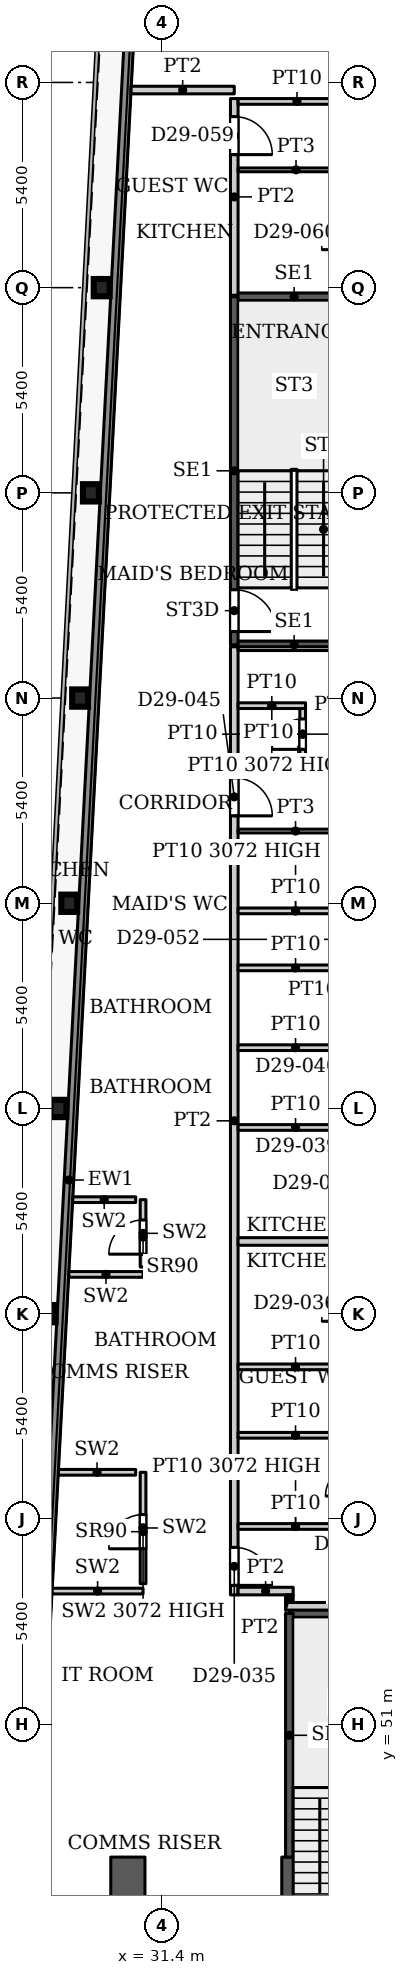
"""IFC4 building model, lengths in metres.
Left out: names, types, materials, properties, quantities, classifications, styles, units other than length and angle.
Written with IfcOpenShell. Run it as: python <this file> out.ifc"""

import sys

from ifc_helpers import new_model, si_unit, direction, frame, frame_2d, origin, origin_2d, place, context, subcontext, project, spatial, rectangle, i_section, extrude, source, transform, mapped, element, fill, save


model = new_model("IFC4")
c1 = context("Model", 3, precision=1e-05, world=origin(), true_north=direction((0.0, 1.0)))
c2 = subcontext(c1, "Body", "Model", "MODEL_VIEW")
j1 = project(units=[si_unit("LENGTHUNIT", "METRE"), si_unit("PLANEANGLEUNIT", "RADIAN")], contexts=[c1])
p1 = place(None, origin())
s1 = spatial("IfcSite", under=j1, at=p1, CompositionType="ELEMENT")
p2 = place(p1, origin())
s2 = spatial("IfcBuilding", under=s1, at=p2, CompositionType="ELEMENT")
p3 = place(p2, frame((0.0, 0.0, 129.2)))
s3 = spatial("IfcBuildingStorey", under=s2, at=p3, CompositionType="ELEMENT", Elevation=129.2)
for number, where, z_axis, x_axis in (
    (1, (28.39, 61.8, 0.0), (0.0, 0.0, 1.0), (1.0, 0.0, 0.0)),
    (2, (28.674, 67.2, 0.0), (0.0, 0.0, 1.0), (1.0, 0.0, 0.0)),
    (3, (28.958, 72.6, 0.0), (0.0, 0.0, 1.0), (1.0, 0.0, 0.0)),
    (4, (29.243, 78.0, 0.0), (0.0, 0.0, 1.0), (1.0, 0.0, 0.0)),
    (5, (29.527, 83.4, 0.0), (0.0, 0.0, 1.0), (1.0, 0.0, 0.0)),
    (6, (29.811, 88.8, 0.0), (0.0, 0.0, 1.0), (1.0, 0.0, 0.0)),
):
    element("IfcColumn", number, at=place(p3, frame(where, z_axis=z_axis, x_axis=x_axis)), inside=s3, PredefinedType="COLUMN", context=c2, shape_type="SweptSolid", body=[
        extrude(i_section(OverallWidth=0.418, OverallDepth=0.455, WebThickness=0.042, FlangeThickness=0.068, FilletRadius=0.014, at=origin_2d()), origin(), (0.0, 0.0, 1.0), 3.9),
    ])
p4 = place(p3, frame((34.75, 29.05, 0.0), z_axis=(0.0, 0.0, 1.0), x_axis=(0.0, 1.0, 0.0)))
e7 = element("IfcWall", 7, at=p4, inside=s3, PredefinedType="SHEAR", context=c2, shape_type="SweptSolid", body=[
    extrude(rectangle(XDim=18.45, YDim=0.4, at=frame_2d((9.225, 0.0))), origin(), (0.0, 0.0, 1.0), 3.9),
])
p5 = place(p4, frame((8.025, 0.0, 0.0)))
e8 = element("IfcOpeningElement", 8, at=p5, cuts=e7, PredefinedType="OPENING", context=c2, shape_type="SweptSolid", body=[
    extrude(rectangle(XDim=1.1, YDim=2.2, at=frame_2d((0.55, 1.1))), frame((0.0, 0.21, 0.0), z_axis=(0.0, -1.0, 0.0), x_axis=(1.0, 0.0, 0.0)), (0.0, 0.0, 1.0), 0.42),
])
p6 = place(p4, frame((10.875, 0.0, 0.0)))
e9 = element("IfcOpeningElement", 9, at=p6, cuts=e7, PredefinedType="OPENING", context=c2, shape_type="SweptSolid", body=[
    extrude(rectangle(XDim=1.1, YDim=2.2, at=frame_2d((0.55, 1.1))), frame((0.0, 0.21, 0.0), z_axis=(0.0, -1.0, 0.0), x_axis=(1.0, 0.0, 0.0)), (0.0, 0.0, 1.0), 0.42),
])
p7 = place(p4, frame((13.725, 0.0, 0.0)))
e10 = element("IfcOpeningElement", 10, at=p7, cuts=e7, PredefinedType="OPENING", context=c2, shape_type="SweptSolid", body=[
    extrude(rectangle(XDim=1.1, YDim=2.2, at=frame_2d((0.55, 1.1))), frame((0.0, 0.21, 0.0), z_axis=(0.0, -1.0, 0.0), x_axis=(1.0, 0.0, 0.0)), (0.0, 0.0, 1.0), 0.42),
])
p8 = place(p4, frame((15.95, 0.0, 0.0)))
e11 = element("IfcOpeningElement", 11, at=p8, cuts=e7, PredefinedType="OPENING", context=c2, shape_type="SweptSolid", body=[
    extrude(rectangle(XDim=1.1, YDim=2.2, at=frame_2d((0.55, 1.1))), frame((0.0, 0.21, 0.0), z_axis=(0.0, -1.0, 0.0), x_axis=(1.0, 0.0, 0.0)), (0.0, 0.0, 1.0), 0.42),
])
p9 = place(p3, frame((30.5, 29.05, 0.0), z_axis=(0.0, 0.0, 1.0), x_axis=(0.0, 1.0, 0.0)))
e12 = element("IfcWall", 12, at=p9, inside=s3, PredefinedType="SHEAR", context=c2, shape_type="SweptSolid", body=[
    extrude(rectangle(XDim=18.45, YDim=0.9, at=frame_2d((9.225, 0.0))), origin(), (0.0, 0.0, 1.0), 3.9),
])
p10 = place(p9, frame((1.5, 0.0, 0.0)))
e13 = element("IfcOpeningElement", 13, at=p10, cuts=e12, PredefinedType="OPENING", context=c2, shape_type="SweptSolid", body=[
    extrude(rectangle(XDim=0.9, YDim=2.2, at=frame_2d((0.45, 1.1))), frame((0.0, 0.46, 0.0), z_axis=(0.0, -1.0, 0.0), x_axis=(1.0, 0.0, 0.0)), (0.0, 0.0, 1.0), 0.92),
])
p11 = place(p9, frame((7.406, 0.0, 0.0)))
e14 = element("IfcOpeningElement", 14, at=p11, cuts=e12, PredefinedType="OPENING", context=c2, shape_type="SweptSolid", body=[
    extrude(rectangle(XDim=0.9, YDim=2.2, at=frame_2d((0.45, 1.1))), frame((0.0, 0.46, 0.0), z_axis=(0.0, -1.0, 0.0), x_axis=(1.0, 0.0, 0.0)), (0.0, 0.0, 1.0), 0.92),
])
p12 = place(p9, frame((11.688, 0.0, 0.0)))
e15 = element("IfcOpeningElement", 15, at=p12, cuts=e12, PredefinedType="OPENING", context=c2, shape_type="SweptSolid", body=[
    extrude(rectangle(XDim=0.9, YDim=2.2, at=frame_2d((0.45, 1.1))), frame((0.0, 0.46, 0.0), z_axis=(0.0, -1.0, 0.0), x_axis=(1.0, 0.0, 0.0)), (0.0, 0.0, 1.0), 0.92),
])
p13 = place(p3, frame((27.195, 31.969, 0.0), z_axis=(0.0, 0.0, 1.0), x_axis=(0.052554995867, 0.998618031286, 0.0)))
e16 = element("IfcWall", 16, at=p13, inside=s3, PredefinedType="SOLIDWALL", context=c2, shape_type="SweptSolid", body=[
    extrude(rectangle(XDim=66.787, YDim=0.25, at=frame_2d((33.394, 0.0))), origin(), (0.0, 0.0, 1.0), 3.75),
])
p14 = place(p3, frame((34.75, 53.91, 0.0), z_axis=(0.0, 0.0, 1.0), x_axis=(1.0, 0.0, 0.0)))
e17 = element("IfcWall", 17, at=p14, inside=s3, PredefinedType="SHEAR", context=c2, shape_type="SweptSolid", body=[
    extrude(rectangle(XDim=3.15, YDim=0.2, at=frame_2d((1.575, 0.0))), origin(), (0.0, 0.0, 1.0), 3.9),
])
p15 = place(p3, frame((34.75, 47.5, 0.0), z_axis=(0.0, 0.0, 1.0), x_axis=(0.0, 1.0, 0.0)))
e18 = element("IfcWall", 18, at=p15, inside=s3, PredefinedType="SHEAR", context=c2, shape_type="SweptSolid", body=[
    extrude(rectangle(XDim=6.41, YDim=0.2, at=frame_2d((3.205, 0.0))), origin(), (0.0, 0.0, 1.0), 3.9),
])
for number, where, z_axis, x_axis in (
    (19, (33.3, 79.4, 0.0), (0.0, 0.0, 1.0), (1.0, 0.0, 0.0)),
    (20, (33.3, 88.56, 0.0), (0.0, 0.0, 1.0), (1.0, 0.0, 0.0)),
):
    element("IfcWall", number, at=place(p3, frame(where, z_axis=z_axis, x_axis=x_axis)), inside=s3, PredefinedType="SHEAR", context=c2, shape_type="SweptSolid", body=[
        extrude(rectangle(XDim=3.15, YDim=0.2, at=frame_2d((1.575, 0.0))), origin(), (0.0, 0.0, 1.0), 3.9),
    ])
p16 = place(p3, frame((33.3, 79.4, 0.0), z_axis=(0.0, 0.0, 1.0), x_axis=(0.0, 1.0, 0.0)))
e21 = element("IfcWall", 21, at=p16, inside=s3, PredefinedType="SHEAR", context=c2, shape_type="SweptSolid", body=[
    extrude(rectangle(XDim=9.16, YDim=0.2, at=frame_2d((4.58, 0.0))), origin(), (0.0, 0.0, 1.0), 3.9),
])
p17 = place(p16, frame((0.35, 0.0, 0.0)))
e22 = element("IfcOpeningElement", 22, at=p17, cuts=e21, PredefinedType="OPENING", context=c2, shape_type="SweptSolid", body=[
    extrude(rectangle(XDim=1.1, YDim=2.2, at=frame_2d((0.55, 1.1))), frame((0.0, 0.11, 0.0), z_axis=(0.0, -1.0, 0.0), x_axis=(1.0, 0.0, 0.0)), (0.0, 0.0, 1.0), 0.22),
])
p18 = place(p3, frame((28.508, 54.5, 0.0), z_axis=(0.0, 0.0, 1.0), x_axis=(1.0, 0.0, 0.0)))
e23 = element("IfcWall", 23, at=p18, inside=s3, PredefinedType="PARTITIONING", context=c2, shape_type="SweptSolid", body=[
    extrude(rectangle(XDim=2.392, YDim=0.15, at=frame_2d((1.196, 0.0))), origin(), (0.0, 0.0, 1.0), 3.9),
])
p19 = place(p3, frame((30.9, 54.695, 0.0), z_axis=(0.0, 0.0, 1.0), x_axis=(0.0, 1.0, 0.0)))
e24 = element("IfcWall", 24, at=p19, inside=s3, PredefinedType="PARTITIONING", context=c2, shape_type="SweptSolid", body=[
    extrude(rectangle(XDim=2.931, YDim=0.15, at=frame_2d((1.465, 0.0))), origin(), (0.0, 0.0, 1.0), 3.072),
])
p20 = place(p19, frame((0.918, 0.0, 0.0)))
e25 = element("IfcOpeningElement", 25, at=p20, cuts=e24, PredefinedType="OPENING", context=c2, shape_type="SweptSolid", body=[
    extrude(rectangle(XDim=0.9, YDim=2.2, at=frame_2d((0.45, 1.1))), frame((0.0, 0.085, 0.0), z_axis=(0.0, -1.0, 0.0), x_axis=(1.0, 0.0, 0.0)), (0.0, 0.0, 1.0), 0.17),
])
p21 = place(p3, frame((28.673, 57.626, 0.0), z_axis=(0.0, 0.0, 1.0), x_axis=(1.0, 0.0, 0.0)))
e26 = element("IfcWall", 26, at=p21, inside=s3, PredefinedType="PARTITIONING", context=c2, shape_type="SweptSolid", body=[
    extrude(rectangle(XDim=2.032, YDim=0.15, at=frame_2d((1.016, 0.0))), origin(), (0.0, 0.0, 1.0), 3.9),
])
p22 = place(p3, frame((28.947, 62.833, 0.0), z_axis=(0.0, 0.0, 1.0), x_axis=(1.0, 0.0, 0.0)))
e27 = element("IfcWall", 27, at=p22, inside=s3, PredefinedType="PARTITIONING", context=c2, shape_type="SweptSolid", body=[
    extrude(rectangle(XDim=1.953, YDim=0.15, at=frame_2d((0.977, 0.0))), origin(), (0.0, 0.0, 1.0), 3.9),
])
p23 = place(p3, frame((30.9, 63.028, 0.0), z_axis=(0.0, 0.0, 1.0), x_axis=(0.0, 1.0, 0.0)))
e28 = element("IfcWall", 28, at=p23, inside=s3, PredefinedType="PARTITIONING", context=c2, shape_type="SweptSolid", body=[
    extrude(rectangle(XDim=1.772, YDim=0.15, at=frame_2d((0.886, 0.0))), origin(), (0.0, 0.0, 1.0), 3.9),
])
p24 = place(p23, frame((0.338, 0.0, 0.0)))
e29 = element("IfcOpeningElement", 29, at=p24, cuts=e28, PredefinedType="OPENING", context=c2, shape_type="SweptSolid", body=[
    extrude(rectangle(XDim=0.9, YDim=2.2, at=frame_2d((0.45, 1.1))), frame((0.0, 0.085, 0.0), z_axis=(0.0, -1.0, 0.0), x_axis=(1.0, 0.0, 0.0)), (0.0, 0.0, 1.0), 0.17),
])
p25 = place(p3, frame((29.05, 64.8, 0.0), z_axis=(0.0, 0.0, 1.0), x_axis=(1.0, 0.0, 0.0)))
e30 = element("IfcWall", 30, at=p25, inside=s3, PredefinedType="PARTITIONING", context=c2, shape_type="SweptSolid", body=[
    extrude(rectangle(XDim=1.655, YDim=0.15, at=frame_2d((0.828, 0.0))), origin(), (0.0, 0.0, 1.0), 3.9),
])
p26 = place(p3, frame((30.585, 94.0, 0.0), z_axis=(0.0, 0.0, 1.0), x_axis=(1.0, 0.0, 0.0)))
e31 = element("IfcWall", 31, at=p26, inside=s3, PredefinedType="PARTITIONING", context=c2, shape_type="SweptSolid", body=[
    extrude(rectangle(XDim=2.715, YDim=0.2, at=frame_2d((1.358, 0.0))), origin(), (0.0, 0.0, 1.0), 3.6),
])
p27 = place(p3, frame((33.3, 54.4, 0.0), z_axis=(0.0, 0.0, 1.0), x_axis=(0.0, 1.0, 0.0)))
e32 = element("IfcWall", 32, at=p27, inside=s3, PredefinedType="PARTITIONING", context=c2, shape_type="SweptSolid", body=[
    extrude(rectangle(XDim=24.95, YDim=0.2, at=frame_2d((12.475, 0.0))), origin(), (0.0, 0.0, 1.0), 3.6),
])
p28 = place(p27, frame((0.25, 0.0, 0.0)))
e33 = element("IfcOpeningElement", 33, at=p28, cuts=e32, PredefinedType="OPENING", context=c2, shape_type="SweptSolid", body=[
    extrude(rectangle(XDim=1.0, YDim=2.1, at=frame_2d((0.5, 1.05))), frame((0.0, 0.11, 0.0), z_axis=(0.0, -1.0, 0.0), x_axis=(1.0, 0.0, 0.0)), (0.0, 0.0, 1.0), 0.22),
])
p29 = place(p27, frame((20.5, 0.0, 0.0)))
e34 = element("IfcOpeningElement", 34, at=p29, cuts=e32, PredefinedType="OPENING", context=c2, shape_type="SweptSolid", body=[
    extrude(rectangle(XDim=1.0, YDim=2.1, at=frame_2d((0.5, 1.05))), frame((0.0, 0.11, 0.0), z_axis=(0.0, -1.0, 0.0), x_axis=(1.0, 0.0, 0.0)), (0.0, 0.0, 1.0), 0.22),
])
p30 = place(p3, frame((33.3, 88.6, 0.0), z_axis=(0.0, 0.0, 1.0), x_axis=(0.0, 1.0, 0.0)))
e35 = element("IfcWall", 35, at=p30, inside=s3, PredefinedType="PARTITIONING", context=c2, shape_type="SweptSolid", body=[
    extrude(rectangle(XDim=5.175, YDim=0.2, at=frame_2d((2.587, 0.0))), origin(), (0.0, 0.0, 1.0), 3.6),
])
p31 = place(p30, frame((3.7, 0.0, 0.0)))
e36 = element("IfcOpeningElement", 36, at=p31, cuts=e35, PredefinedType="OPENING", context=c2, shape_type="SweptSolid", body=[
    extrude(rectangle(XDim=1.0, YDim=2.1, at=frame_2d((0.5, 1.05))), frame((0.0, 0.11, 0.0), z_axis=(0.0, -1.0, 0.0), x_axis=(1.0, 0.0, 0.0)), (0.0, 0.0, 1.0), 0.22),
])
p32 = place(p3, frame((33.4, 54.5, 0.0), z_axis=(0.0, 0.0, 1.0), x_axis=(1.0, 0.0, 0.0)))
e37 = element("IfcWall", 37, at=p32, inside=s3, PredefinedType="PARTITIONING", context=c2, shape_type="SweptSolid", body=[
    extrude(rectangle(XDim=1.45, YDim=0.2, at=frame_2d((0.725, 0.0))), origin(), (0.0, 0.0, 1.0), 3.6),
])
p33 = place(p3, frame((33.4, 56.2, 0.0), z_axis=(0.0, 0.0, 1.0), x_axis=(1.0, 0.0, 0.0)))
e38 = element("IfcWall", 38, at=p33, inside=s3, PredefinedType="PARTITIONING", context=c2, shape_type="SweptSolid", body=[
    extrude(rectangle(XDim=3.025, YDim=0.15, at=frame_2d((1.513, 0.0))), origin(), (0.0, 0.0, 1.0), 3.072),
])
for number, where, z_axis, x_axis in (
    (39, (33.4, 58.6, 0.0), (0.0, 0.0, 1.0), (1.0, 0.0, 0.0)),
    (40, (33.4, 60.4, 0.0), (0.0, 0.0, 1.0), (1.0, 0.0, 0.0)),
):
    element("IfcWall", number, at=place(p3, frame(where, z_axis=z_axis, x_axis=x_axis)), inside=s3, PredefinedType="PARTITIONING", context=c2, shape_type="SweptSolid", body=[
        extrude(rectangle(XDim=3.025, YDim=0.15, at=frame_2d((1.513, 0.0))), origin(), (0.0, 0.0, 1.0), 3.6),
    ])
p34 = place(p3, frame((33.4, 63.7, 0.0), z_axis=(0.0, 0.0, 1.0), x_axis=(1.0, 0.0, 0.0)))
e41 = element("IfcWall", 41, at=p34, inside=s3, PredefinedType="PARTITIONING", context=c2, shape_type="SweptSolid", body=[
    extrude(rectangle(XDim=12.5, YDim=0.2, at=frame_2d((6.25, 0.0))), origin(), (0.0, 0.0, 1.0), 3.6),
])
for number, where, z_axis, x_axis in (
    (42, (33.4, 66.7, 0.0), (0.0, 0.0, 1.0), (1.0, 0.0, 0.0)),
    (43, (33.4, 68.8, 0.0), (0.0, 0.0, 1.0), (1.0, 0.0, 0.0)),
    (44, (33.4, 70.9, 0.0), (0.0, 0.0, 1.0), (1.0, 0.0, 0.0)),
):
    element("IfcWall", number, at=place(p3, frame(where, z_axis=z_axis, x_axis=x_axis)), inside=s3, PredefinedType="PARTITIONING", context=c2, shape_type="SweptSolid", body=[
        extrude(rectangle(XDim=3.025, YDim=0.15, at=frame_2d((1.513, 0.0))), origin(), (0.0, 0.0, 1.0), 3.6),
    ])
p35 = place(p3, frame((33.4, 72.4, 0.0), z_axis=(0.0, 0.0, 1.0), x_axis=(1.0, 0.0, 0.0)))
e45 = element("IfcWall", 45, at=p35, inside=s3, PredefinedType="PARTITIONING", context=c2, shape_type="SweptSolid", body=[
    extrude(rectangle(XDim=3.025, YDim=0.15, at=frame_2d((1.513, 0.0))), origin(), (0.0, 0.0, 1.0), 3.072),
])
p36 = place(p3, frame((33.4, 74.5, 0.0), z_axis=(0.0, 0.0, 1.0), x_axis=(1.0, 0.0, 0.0)))
e46 = element("IfcWall", 46, at=p36, inside=s3, PredefinedType="PARTITIONING", context=c2, shape_type="SweptSolid", body=[
    extrude(rectangle(XDim=3.025, YDim=0.1, at=frame_2d((1.513, 0.0))), origin(), (0.0, 0.0, 1.0), 3.6),
])
p37 = place(p3, frame((33.4, 76.3, 0.0), z_axis=(0.0, 0.0, 1.0), x_axis=(1.0, 0.0, 0.0)))
e47 = element("IfcWall", 47, at=p37, inside=s3, PredefinedType="PARTITIONING", context=c2, shape_type="SweptSolid", body=[
    extrude(rectangle(XDim=3.15, YDim=0.15, at=frame_2d((1.575, 0.0))), origin(), (0.0, 0.0, 1.0), 3.6),
])
p38 = place(p3, frame((33.4, 77.8, 0.0), z_axis=(0.0, 0.0, 1.0), x_axis=(1.0, 0.0, 0.0)))
e48 = element("IfcWall", 48, at=p38, inside=s3, PredefinedType="PARTITIONING", context=c2, shape_type="SweptSolid", body=[
    extrude(rectangle(XDim=1.775, YDim=0.15, at=frame_2d((0.888, 0.0))), origin(), (0.0, 0.0, 1.0), 3.072),
])
p39 = place(p3, frame((33.4, 79.3, 0.0), z_axis=(0.0, 0.0, 1.0), x_axis=(1.0, 0.0, 0.0)))
e49 = element("IfcWall", 49, at=p39, inside=s3, PredefinedType="PARTITIONING", context=c2, shape_type="SweptSolid", body=[
    extrude(rectangle(XDim=12.5, YDim=0.1, at=frame_2d((6.25, 0.0))), origin(), (0.0, 0.0, 1.0), 3.6),
])
p40 = place(p39, frame((3.35, 0.0, 0.0)))
e50 = element("IfcOpeningElement", 50, at=p40, cuts=e49, PredefinedType="OPENING", context=c2, shape_type="SweptSolid", body=[
    extrude(rectangle(XDim=0.9, YDim=2.1, at=frame_2d((0.45, 1.05))), frame((0.0, 0.06, 0.0), z_axis=(0.0, -1.0, 0.0), x_axis=(1.0, 0.0, 0.0)), (0.0, 0.0, 1.0), 0.12),
])
p41 = place(p3, frame((33.4, 91.9, 0.0), z_axis=(0.0, 0.0, 1.0), x_axis=(1.0, 0.0, 0.0)))
e51 = element("IfcWall", 51, at=p41, inside=s3, PredefinedType="PARTITIONING", context=c2, shape_type="SweptSolid", body=[
    extrude(rectangle(XDim=3.05, YDim=0.1, at=frame_2d((1.525, 0.0))), origin(), (0.0, 0.0, 1.0), 3.6),
])
p42 = place(p3, frame((33.4, 93.7, 0.0), z_axis=(0.0, 0.0, 1.0), x_axis=(1.0, 0.0, 0.0)))
e52 = element("IfcWall", 52, at=p42, inside=s3, PredefinedType="PARTITIONING", context=c2, shape_type="SweptSolid", body=[
    extrude(rectangle(XDim=3.1, YDim=0.15, at=frame_2d((1.55, 0.0))), origin(), (0.0, 0.0, 1.0), 3.6),
])
p43 = place(p3, frame((34.65, 54.1, 0.0), z_axis=(0.0, 0.0, 1.0), x_axis=(1.0, 0.0, 0.0)))
e53 = element("IfcWall", 53, at=p43, inside=s3, PredefinedType="PARTITIONING", context=c2, shape_type="SweptSolid", body=[
    extrude(rectangle(XDim=11.25, YDim=0.2, at=frame_2d((5.625, 0.0))), origin(), (0.0, 0.0, 1.0), 3.6),
])
p44 = place(p3, frame((34.75, 54.2, 0.0), z_axis=(0.0, 0.0, 1.0), x_axis=(0.0, 1.0, 0.0)))
e54 = element("IfcWall", 54, at=p44, inside=s3, PredefinedType="PARTITIONING", context=c2, shape_type="SweptSolid", body=[
    extrude(rectangle(XDim=0.2, YDim=0.2, at=frame_2d((0.1, 0.0))), origin(), (0.0, 0.0, 1.0), 3.6),
])
p45 = place(p3, frame((35.1, 76.375, 0.0), z_axis=(0.0, 0.0, 1.0), x_axis=(0.0, 1.0, 0.0)))
e55 = element("IfcWall", 55, at=p45, inside=s3, PredefinedType="PARTITIONING", context=c2, shape_type="SweptSolid", body=[
    extrude(rectangle(XDim=1.35, YDim=0.15, at=frame_2d((0.675, 0.0))), origin(), (0.0, 0.0, 1.0), 3.6),
])
p46 = place(p45, frame((0.275, 0.0, 0.0)))
e56 = element("IfcOpeningElement", 56, at=p46, cuts=e55, PredefinedType="OPENING", context=c2, shape_type="SweptSolid", body=[
    extrude(rectangle(XDim=0.8, YDim=2.1, at=frame_2d((0.4, 1.05))), frame((0.0, 0.085, 0.0), z_axis=(0.0, -1.0, 0.0), x_axis=(1.0, 0.0, 0.0)), (0.0, 0.0, 1.0), 0.17),
])
m1 = source(origin(), c2, "Body", "SweptSolid", [
    extrude(rectangle(XDim=0.9, YDim=2.2, at=frame_2d((0.45, 1.1))), frame((0.0, 0.025, 0.0), z_axis=(0.0, -1.0, 0.0), x_axis=(1.0, 0.0, 0.0)), (0.0, 0.0, 1.0), 0.05),
])
p47 = place(p20, origin())
e57 = element("IfcDoor", 57, at=p47, inside=s3, OperationType="SINGLE_SWING_LEFT", PredefinedType="DOOR", context=c2, shape_type="MappedRepresentation", body=[
    mapped(m1, transform((0.0, 0.0, 0.0), x_axis=(1.0, 0.0, 0.0), y_axis=(0.0, 1.0, 0.0), z_axis=(0.0, 0.0, 1.0), scale=1.0)),
])
fill(e25, e57)
p48 = place(p24, origin())
e58 = element("IfcDoor", 58, at=p48, inside=s3, OperationType="SINGLE_SWING_LEFT", PredefinedType="DOOR", context=c2, shape_type="MappedRepresentation", body=[
    mapped(m1, transform((0.0, 0.0, 0.0), x_axis=(1.0, 0.0, 0.0), y_axis=(0.0, 1.0, 0.0), z_axis=(0.0, 0.0, 1.0), scale=1.0)),
])
fill(e29, e58)
m2 = source(origin(), c2, "Body", "SweptSolid", [
    extrude(rectangle(XDim=1.1, YDim=2.2, at=frame_2d((0.55, 1.1))), frame((0.0, 0.025, 0.0), z_axis=(0.0, -1.0, 0.0), x_axis=(1.0, 0.0, 0.0)), (0.0, 0.0, 1.0), 0.05),
])
p49 = place(p17, origin())
e59 = element("IfcDoor", 59, at=p49, inside=s3, OperationType="SINGLE_SWING_RIGHT", PredefinedType="DOOR", context=c2, shape_type="MappedRepresentation", body=[
    mapped(m2, transform((0.0, 0.0, 0.0), x_axis=(1.0, 0.0, 0.0), y_axis=(0.0, 1.0, 0.0), z_axis=(0.0, 0.0, 1.0), scale=1.0)),
])
fill(e22, e59)
m3 = source(origin(), c2, "Body", "SweptSolid", [
    extrude(rectangle(XDim=1.0, YDim=2.1, at=frame_2d((0.5, 1.05))), frame((0.0, 0.025, 0.0), z_axis=(0.0, -1.0, 0.0), x_axis=(1.0, 0.0, 0.0)), (0.0, 0.0, 1.0), 0.05),
])
p50 = place(p28, origin())
e60 = element("IfcDoor", 60, at=p50, inside=s3, OperationType="SINGLE_SWING_RIGHT", PredefinedType="DOOR", context=c2, shape_type="MappedRepresentation", body=[
    mapped(m3, transform((0.0, 0.0, 0.0), x_axis=(1.0, 0.0, 0.0), y_axis=(0.0, 1.0, 0.0), z_axis=(0.0, 0.0, 1.0), scale=1.0)),
])
fill(e33, e60)
p51 = place(p29, origin())
e61 = element("IfcDoor", 61, at=p51, inside=s3, OperationType="SINGLE_SWING_RIGHT", PredefinedType="DOOR", context=c2, shape_type="MappedRepresentation", body=[
    mapped(m3, transform((0.0, 0.0, 0.0), x_axis=(1.0, 0.0, 0.0), y_axis=(0.0, 1.0, 0.0), z_axis=(0.0, 0.0, 1.0), scale=1.0)),
])
fill(e34, e61)
m4 = source(origin(), c2, "Body", "SweptSolid", [
    extrude(rectangle(XDim=0.8, YDim=2.1, at=frame_2d((0.4, 1.05))), frame((0.0, 0.025, 0.0), z_axis=(0.0, -1.0, 0.0), x_axis=(1.0, 0.0, 0.0)), (0.0, 0.0, 1.0), 0.05),
])
p52 = place(p46, origin())
e62 = element("IfcDoor", 62, at=p52, inside=s3, OperationType="SINGLE_SWING_LEFT", PredefinedType="DOOR", context=c2, shape_type="MappedRepresentation", body=[
    mapped(m4, transform((0.0, 0.0, 0.0), x_axis=(1.0, 0.0, 0.0), y_axis=(0.0, 1.0, 0.0), z_axis=(0.0, 0.0, 1.0), scale=1.0)),
])
fill(e56, e62)
p53 = place(p31, origin())
e63 = element("IfcDoor", 63, at=p53, inside=s3, OperationType="SINGLE_SWING_RIGHT", PredefinedType="DOOR", context=c2, shape_type="MappedRepresentation", body=[
    mapped(m3, transform((0.0, 0.0, 0.0), x_axis=(1.0, 0.0, 0.0), y_axis=(0.0, 1.0, 0.0), z_axis=(0.0, 0.0, 1.0), scale=1.0)),
])
fill(e36, e63)
save(model, sys.argv[1])
